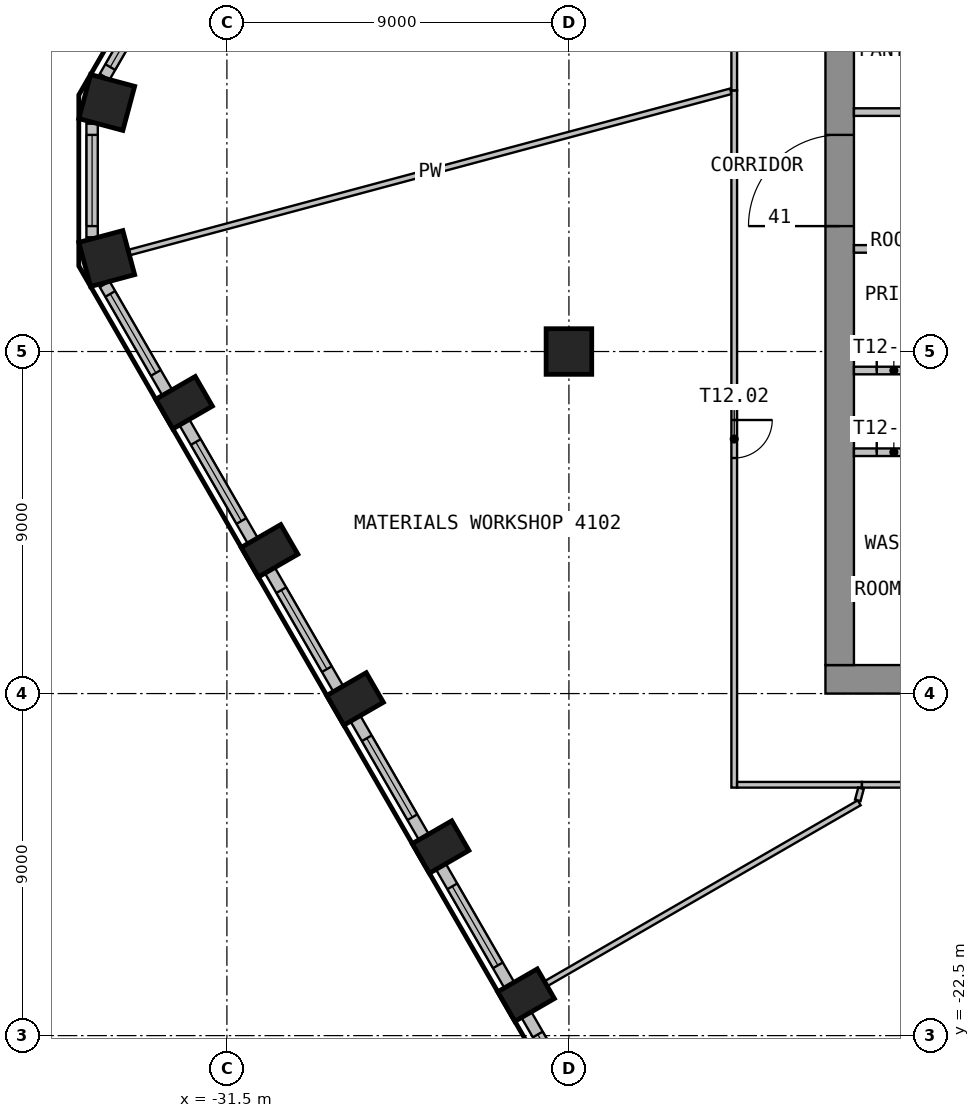
"""IFC4 building model, lengths in metres.
Left out: names, types, materials, properties, quantities, classifications, styles, units other than length and angle.
Written with IfcOpenShell. Run it as: python <this file> out.ifc"""

import sys

from ifc_helpers import new_model, si_unit, direction, frame, frame_2d, origin, origin_2d, place, context, subcontext, project, spatial, rectangle, circle, extrude, element, fill, save


model = new_model("IFC4")
c1 = context("Model", 3, precision=1e-05, world=origin(), true_north=direction((0.0, 1.0)))
c2 = subcontext(c1, "Body", "Model", "MODEL_VIEW")
j1 = project(units=[si_unit("LENGTHUNIT", "METRE"), si_unit("PLANEANGLEUNIT", "RADIAN")], contexts=[c1])
p1 = place(None, origin())
s1 = spatial("IfcSite", under=j1, at=p1, CompositionType="ELEMENT")
p2 = place(p1, origin())
s2 = spatial("IfcBuilding", under=s1, at=p2, CompositionType="ELEMENT")
p3 = place(p2, frame((0.0, 0.0, 167.7)))
s3 = spatial("IfcBuildingStorey", under=s2, at=p3, CompositionType="ELEMENT", Elevation=167.7)
for number, where, z_axis, x_axis in (
    (1, (-34.662, 2.053, 0.0), (0.0, 0.0, 1.0), (-0.259, -0.966, 0.0)),
    (2, (-34.662, -2.053, 0.0), (0.0, 0.0, 1.0), (0.259, -0.966, 0.0)),
):
    element("IfcColumn", number, at=place(p3, frame(where, z_axis=z_axis, x_axis=x_axis)), inside=s3, PredefinedType="COLUMN", context=c2, shape_type="SweptSolid", body=[
        extrude(rectangle(XDim=1.2, YDim=1.2, at=origin_2d()), origin(), (0.0, 0.0, 1.0), 3.575),
    ])
for number, where, z_axis, x_axis in (
    (3, (-32.627, -5.847, 0.0), (0.0, 0.0, 1.0), (0.5, -0.866, 0.0)),
    (4, (-30.377, -9.744, 0.0), (0.0, 0.0, 1.0), (0.5, -0.866, 0.0)),
    (5, (-28.127, -13.641, 0.0), (0.0, 0.0, 1.0), (0.5, -0.866, 0.0)),
    (6, (-25.877, -17.539, 0.0), (0.0, 0.0, 1.0), (0.5, -0.866, 0.0)),
    (7, (-23.627, -21.436, 0.0), (0.0, 0.0, 1.0), (0.5, -0.866, 0.0)),
):
    element("IfcColumn", number, at=place(p3, frame(where, z_axis=z_axis, x_axis=x_axis)), inside=s3, PredefinedType="COLUMN", context=c2, shape_type="SweptSolid", body=[
        extrude(rectangle(XDim=0.9, YDim=1.2, at=origin_2d()), origin(), (0.0, 0.0, 1.0), 3.575),
    ])
p4 = place(p3, frame((-22.5, -4.5, 0.0), z_axis=(0.0, 0.0, 1.0), x_axis=(1.0, 0.0, 0.0)))
e8 = element("IfcColumn", 8, at=p4, inside=s3, PredefinedType="COLUMN", context=c2, shape_type="SweptSolid", body=[
    extrude(circle(Radius=0.6, at=origin_2d()), origin(), (0.0, 0.0, 1.0), 3.575),
])
p5 = place(p3, frame((-33.069, 5.582, 0.0), z_axis=(0.0, 0.0, 1.0), x_axis=(-0.499981217486, -0.866036247602, 0.0)))
e9 = element("IfcWall", 9, at=p5, inside=s3, PredefinedType="SOLIDWALL", context=c2, shape_type="SweptSolid", body=[
    extrude(rectangle(XDim=3.294, YDim=0.3, at=frame_2d((1.647, 0.0))), origin(), (0.0, 0.0, 1.0), 3.575),
])
p6 = place(p5, frame((0.6, 0.0, 0.9)))
e10 = element("IfcOpeningElement", 10, at=p6, cuts=e9, PredefinedType="OPENING", context=c2, shape_type="SweptSolid", body=[
    extrude(rectangle(XDim=2.4, YDim=2.1, at=frame_2d((1.2, 1.05))), frame((0.0, 0.16, 0.0), z_axis=(0.0, -1.0, 0.0), x_axis=(1.0, 0.0, 0.0)), (0.0, 0.0, 1.0), 0.32),
])
p7 = place(p3, frame((-35.047, 1.495, 0.0), z_axis=(0.0, 0.0, 1.0), x_axis=(0.0, -1.0, 0.0)))
e11 = element("IfcWall", 11, at=p7, inside=s3, PredefinedType="SOLIDWALL", context=c2, shape_type="SweptSolid", body=[
    extrude(rectangle(XDim=2.989, YDim=0.3, at=frame_2d((1.495, 0.0))), origin(), (0.0, 0.0, 1.0), 3.575),
])
p8 = place(p7, frame((0.295, 0.0, 0.9)))
e12 = element("IfcOpeningElement", 12, at=p8, cuts=e11, PredefinedType="OPENING", context=c2, shape_type="SweptSolid", body=[
    extrude(rectangle(XDim=2.4, YDim=2.1, at=frame_2d((1.2, 1.05))), frame((0.0, 0.16, 0.0), z_axis=(0.0, -1.0, 0.0), x_axis=(1.0, 0.0, 0.0)), (0.0, 0.0, 1.0), 0.32),
])
p9 = place(p3, frame((-34.716, -2.729, 0.0), z_axis=(0.0, 0.0, 1.0), x_axis=(0.499981217486, -0.866036247602, 0.0)))
e13 = element("IfcWall", 13, at=p9, inside=s3, PredefinedType="SOLIDWALL", context=c2, shape_type="SweptSolid", body=[
    extrude(rectangle(XDim=3.294, YDim=0.3, at=frame_2d((1.647, 0.0))), origin(), (0.0, 0.0, 1.0), 3.575),
])
p10 = place(p9, frame((0.295, 0.0, 0.9)))
e14 = element("IfcOpeningElement", 14, at=p10, cuts=e13, PredefinedType="OPENING", context=c2, shape_type="SweptSolid", body=[
    extrude(rectangle(XDim=2.4, YDim=2.1, at=frame_2d((1.2, 1.05))), frame((0.0, 0.16, 0.0), z_axis=(0.0, -1.0, 0.0), x_axis=(1.0, 0.0, 0.0)), (0.0, 0.0, 1.0), 0.32),
])
p11 = place(p3, frame((-32.619, -6.362, 0.0), z_axis=(0.0, 0.0, 1.0), x_axis=(0.500027802648, -0.866009351323, 0.0)))
e15 = element("IfcWall", 15, at=p11, inside=s3, PredefinedType="SOLIDWALL", context=c2, shape_type="SweptSolid", body=[
    extrude(rectangle(XDim=3.599, YDim=0.3, at=frame_2d((1.799, 0.0))), origin(), (0.0, 0.0, 1.0), 3.575),
])
p12 = place(p11, frame((0.6, 0.0, 0.9)))
e16 = element("IfcOpeningElement", 16, at=p12, cuts=e15, PredefinedType="OPENING", context=c2, shape_type="SweptSolid", body=[
    extrude(rectangle(XDim=2.4, YDim=2.1, at=frame_2d((1.2, 1.05))), frame((0.0, 0.16, 0.0), z_axis=(0.0, -1.0, 0.0), x_axis=(1.0, 0.0, 0.0)), (0.0, 0.0, 1.0), 0.32),
])
p13 = place(p3, frame((-30.369, -10.26, 0.0), z_axis=(0.0, 0.0, 1.0), x_axis=(0.500027802648, -0.866009351323, 0.0)))
e17 = element("IfcWall", 17, at=p13, inside=s3, PredefinedType="SOLIDWALL", context=c2, shape_type="SweptSolid", body=[
    extrude(rectangle(XDim=3.599, YDim=0.3, at=frame_2d((1.799, 0.0))), origin(), (0.0, 0.0, 1.0), 3.575),
])
p14 = place(p13, frame((0.6, 0.0, 0.9)))
e18 = element("IfcOpeningElement", 18, at=p14, cuts=e17, PredefinedType="OPENING", context=c2, shape_type="SweptSolid", body=[
    extrude(rectangle(XDim=2.4, YDim=2.1, at=frame_2d((1.2, 1.05))), frame((0.0, 0.16, 0.0), z_axis=(0.0, -1.0, 0.0), x_axis=(1.0, 0.0, 0.0)), (0.0, 0.0, 1.0), 0.32),
])
p15 = place(p3, frame((-28.119, -14.156, 0.0), z_axis=(0.0, 0.0, 1.0), x_axis=(0.500027802648, -0.866009351323, 0.0)))
e19 = element("IfcWall", 19, at=p15, inside=s3, PredefinedType="SOLIDWALL", context=c2, shape_type="SweptSolid", body=[
    extrude(rectangle(XDim=3.599, YDim=0.3, at=frame_2d((1.799, 0.0))), origin(), (0.0, 0.0, 1.0), 3.575),
])
p16 = place(p15, frame((0.6, 0.0, 0.9)))
e20 = element("IfcOpeningElement", 20, at=p16, cuts=e19, PredefinedType="OPENING", context=c2, shape_type="SweptSolid", body=[
    extrude(rectangle(XDim=2.4, YDim=2.1, at=frame_2d((1.2, 1.05))), frame((0.0, 0.16, 0.0), z_axis=(0.0, -1.0, 0.0), x_axis=(1.0, 0.0, 0.0)), (0.0, 0.0, 1.0), 0.32),
])
p17 = place(p3, frame((-25.869, -18.054, 0.0), z_axis=(0.0, 0.0, 1.0), x_axis=(0.500027802648, -0.866009351323, 0.0)))
e21 = element("IfcWall", 21, at=p17, inside=s3, PredefinedType="SOLIDWALL", context=c2, shape_type="SweptSolid", body=[
    extrude(rectangle(XDim=3.599, YDim=0.3, at=frame_2d((1.799, 0.0))), origin(), (0.0, 0.0, 1.0), 3.575),
])
p18 = place(p17, frame((0.6, 0.0, 0.9)))
e22 = element("IfcOpeningElement", 22, at=p18, cuts=e21, PredefinedType="OPENING", context=c2, shape_type="SweptSolid", body=[
    extrude(rectangle(XDim=2.4, YDim=2.1, at=frame_2d((1.2, 1.05))), frame((0.0, 0.16, 0.0), z_axis=(0.0, -1.0, 0.0), x_axis=(1.0, 0.0, 0.0)), (0.0, 0.0, 1.0), 0.32),
])
p19 = place(p3, frame((-23.619, -21.951, 0.0), z_axis=(0.0, 0.0, 1.0), x_axis=(0.500036802197, -0.866004154983, 0.0)))
e23 = element("IfcWall", 23, at=p19, inside=s3, PredefinedType="SOLIDWALL", context=c2, shape_type="SweptSolid", body=[
    extrude(rectangle(XDim=3.294, YDim=0.3, at=frame_2d((1.647, 0.0))), origin(), (0.0, 0.0, 1.0), 3.575),
])
p20 = place(p19, frame((0.6, 0.0, 0.9)))
e24 = element("IfcOpeningElement", 24, at=p20, cuts=e23, PredefinedType="OPENING", context=c2, shape_type="SweptSolid", body=[
    extrude(rectangle(XDim=2.4, YDim=2.1, at=frame_2d((1.2, 1.05))), frame((0.0, 0.16, 0.0), z_axis=(0.0, -1.0, 0.0), x_axis=(1.0, 0.0, 0.0)), (0.0, 0.0, 1.0), 0.32),
])
p21 = place(p3, frame((-15.75, -13.125, 0.0), z_axis=(0.0, 0.0, 1.0), x_axis=(1.0, 0.0, 0.0)))
e25 = element("IfcWall", 25, at=p21, inside=s3, PredefinedType="SHEAR", context=c2, shape_type="SweptSolid", body=[
    extrude(rectangle(XDim=31.5, YDim=0.75, at=frame_2d((15.75, 0.0))), origin(), (0.0, 0.0, 1.0), 3.575),
])
p22 = place(p21, frame((14.55, 0.0, 0.0)))
e26 = element("IfcOpeningElement", 26, at=p22, cuts=e25, PredefinedType="OPENING", context=c2, shape_type="SweptSolid", body=[
    extrude(rectangle(XDim=2.4, YDim=2.1, at=frame_2d((1.2, 1.05))), frame((0.0, 0.385, 0.0), z_axis=(0.0, -1.0, 0.0), x_axis=(1.0, 0.0, 0.0)), (0.0, 0.0, 1.0), 0.77),
])
p23 = place(p21, frame((3.3, 0.0, 0.0)))
e27 = element("IfcOpeningElement", 27, at=p23, cuts=e25, PredefinedType="OPENING", context=c2, shape_type="SweptSolid", body=[
    extrude(rectangle(XDim=1.2, YDim=2.1, at=frame_2d((0.6, 1.05))), frame((0.0, 0.385, 0.0), z_axis=(0.0, -1.0, 0.0), x_axis=(1.0, 0.0, 0.0)), (0.0, 0.0, 1.0), 0.77),
])
p24 = place(p21, frame((27.0, 0.0, 0.0)))
e28 = element("IfcOpeningElement", 28, at=p24, cuts=e25, PredefinedType="OPENING", context=c2, shape_type="SweptSolid", body=[
    extrude(rectangle(XDim=1.2, YDim=2.1, at=frame_2d((0.6, 1.05))), frame((0.0, 0.385, 0.0), z_axis=(0.0, -1.0, 0.0), x_axis=(1.0, 0.0, 0.0)), (0.0, 0.0, 1.0), 0.77),
])
p25 = place(p3, frame((-15.375, -12.75, 0.0), z_axis=(0.0, 0.0, 1.0), x_axis=(0.0, 1.0, 0.0)))
e29 = element("IfcWall", 29, at=p25, inside=s3, PredefinedType="SHEAR", context=c2, shape_type="SweptSolid", body=[
    extrude(rectangle(XDim=25.5, YDim=0.75, at=frame_2d((12.75, 0.0))), origin(), (0.0, 0.0, 1.0), 3.575),
])
p26 = place(p25, frame((11.55, 0.0, 0.0)))
e30 = element("IfcOpeningElement", 30, at=p26, cuts=e29, PredefinedType="OPENING", context=c2, shape_type="SweptSolid", body=[
    extrude(rectangle(XDim=2.4, YDim=2.1, at=frame_2d((1.2, 1.05))), frame((0.0, 0.385, 0.0), z_axis=(0.0, -1.0, 0.0), x_axis=(1.0, 0.0, 0.0)), (0.0, 0.0, 1.0), 0.77),
])
p27 = place(p3, frame((-15.0, 1.8, 0.0), z_axis=(0.0, 0.0, 1.0), x_axis=(1.0, 0.0, 0.0)))
e31 = element("IfcWall", 31, at=p27, inside=s3, PredefinedType="PARTITIONING", context=c2, shape_type="SweptSolid", body=[
    extrude(rectangle(XDim=2.1, YDim=0.2, at=frame_2d((1.05, 0.0))), origin(), (0.0, 0.0, 1.0), 3.575),
])
p28 = place(p3, frame((-15.0, -7.15, 0.0), z_axis=(0.0, 0.0, 1.0), x_axis=(1.0, 0.0, 0.0)))
e32 = element("IfcWall", 32, at=p28, inside=s3, PredefinedType="PARTITIONING", context=c2, shape_type="SweptSolid", body=[
    extrude(rectangle(XDim=2.1, YDim=0.2, at=frame_2d((1.05, 0.0))), origin(), (0.0, 0.0, 1.0), 3.575),
])
p29 = place(p28, frame((0.6, 0.0, 0.0)))
e33 = element("IfcOpeningElement", 33, at=p29, cuts=e32, PredefinedType="OPENING", context=c2, shape_type="SweptSolid", body=[
    extrude(rectangle(XDim=0.9, YDim=2.1, at=frame_2d((0.45, 1.05))), frame((0.0, 0.11, 0.0), z_axis=(0.0, -1.0, 0.0), x_axis=(1.0, 0.0, 0.0)), (0.0, 0.0, 1.0), 0.22),
])
p30 = place(p3, frame((-15.0, -5.0, 0.0), z_axis=(0.0, 0.0, 1.0), x_axis=(1.0, 0.0, 0.0)))
e34 = element("IfcWall", 34, at=p30, inside=s3, PredefinedType="PARTITIONING", context=c2, shape_type="SweptSolid", body=[
    extrude(rectangle(XDim=2.1, YDim=0.2, at=frame_2d((1.05, 0.0))), origin(), (0.0, 0.0, 1.0), 3.575),
])
p31 = place(p30, frame((0.6, 0.0, 0.0)))
e35 = element("IfcOpeningElement", 35, at=p31, cuts=e34, PredefinedType="OPENING", context=c2, shape_type="SweptSolid", body=[
    extrude(rectangle(XDim=0.9, YDim=2.1, at=frame_2d((0.45, 1.05))), frame((0.0, 0.11, 0.0), z_axis=(0.0, -1.0, 0.0), x_axis=(1.0, 0.0, 0.0)), (0.0, 0.0, 1.0), 0.22),
])
p32 = place(p3, frame((-15.0, -1.8, 0.0), z_axis=(0.0, 0.0, 1.0), x_axis=(1.0, 0.0, 0.0)))
e36 = element("IfcWall", 36, at=p32, inside=s3, PredefinedType="PARTITIONING", context=c2, shape_type="SweptSolid", body=[
    extrude(rectangle(XDim=2.1, YDim=0.2, at=frame_2d((1.05, 0.0))), origin(), (0.0, 0.0, 1.0), 3.575),
])
p33 = place(p3, frame((-18.242, 2.346, 0.0), z_axis=(0.0, 0.0, 1.0), x_axis=(-0.965923767179, -0.258826729682, 0.0)))
e37 = element("IfcWall", 37, at=p33, inside=s3, PredefinedType="PARTITIONING", context=c2, shape_type="SweptSolid", body=[
    extrude(rectangle(XDim=16.38, YDim=0.15, at=frame_2d((8.19, 0.0))), origin(), (0.0, 0.0, 1.0), 3.575),
])
p34 = place(p3, frame((-14.861, -16.375, 0.0), z_axis=(0.0, 0.0, 1.0), x_axis=(-0.866011447264, -0.500024172624, 0.0)))
e38 = element("IfcWall", 38, at=p34, inside=s3, PredefinedType="PARTITIONING", context=c2, shape_type="SweptSolid", body=[
    extrude(rectangle(XDim=9.502, YDim=0.15, at=frame_2d((4.751, 0.0))), origin(), (0.0, 0.0, 1.0), 3.575),
])
p35 = place(p3, frame((-18.15, 2.371, 0.0), z_axis=(0.0, 0.0, 1.0), x_axis=(0.0, -1.0, 0.0)))
e39 = element("IfcWall", 39, at=p35, inside=s3, PredefinedType="PARTITIONING", context=c2, shape_type="SweptSolid", body=[
    extrude(rectangle(XDim=18.346, YDim=0.15, at=frame_2d((9.173, 0.0))), origin(), (0.0, 0.0, 1.0), 3.575),
])
p36 = place(p35, frame((8.673, 0.0, 0.0)))
e40 = element("IfcOpeningElement", 40, at=p36, cuts=e39, PredefinedType="OPENING", context=c2, shape_type="SweptSolid", body=[
    extrude(rectangle(XDim=1.0, YDim=2.1, at=frame_2d((0.5, 1.05))), frame((0.0, 0.085, 0.0), z_axis=(0.0, -1.0, 0.0), x_axis=(1.0, 0.0, 0.0)), (0.0, 0.0, 1.0), 0.17),
])
p37 = place(p3, frame((-18.075, -15.9, 0.0), z_axis=(0.0, 0.0, 1.0), x_axis=(1.0, 0.0, 0.0)))
e41 = element("IfcWall", 41, at=p37, inside=s3, PredefinedType="PARTITIONING", context=c2, shape_type="SweptSolid", body=[
    extrude(rectangle(XDim=3.286, YDim=0.15, at=frame_2d((1.643, 0.0))), origin(), (0.0, 0.0, 1.0), 3.575),
])
p38 = place(p3, frame((-18.15, 15.975, 0.0), z_axis=(0.0, 0.0, 1.0), x_axis=(0.0, -1.0, 0.0)))
e42 = element("IfcWall", 42, at=p38, inside=s3, PredefinedType="PARTITIONING", context=c2, shape_type="SweptSolid", body=[
    extrude(rectangle(XDim=13.604, YDim=0.15, at=frame_2d((6.802, 0.0))), origin(), (0.0, 0.0, 1.0), 3.575),
])
p39 = place(p38, frame((6.302, 0.0, 0.0)))
e43 = element("IfcOpeningElement", 43, at=p39, cuts=e42, PredefinedType="OPENING", context=c2, shape_type="SweptSolid", body=[
    extrude(rectangle(XDim=1.0, YDim=2.1, at=frame_2d((0.5, 1.05))), frame((0.0, 0.085, 0.0), z_axis=(0.0, -1.0, 0.0), x_axis=(1.0, 0.0, 0.0)), (0.0, 0.0, 1.0), 0.17),
])
p40 = place(p3, frame((-14.814, -15.992, 0.0), z_axis=(0.0, 0.0, 1.0), x_axis=(-0.257478443243, -0.966284042746, 0.0)))
e44 = element("IfcWall", 44, at=p40, inside=s3, PredefinedType="PARTITIONING", context=c2, shape_type="SweptSolid", body=[
    extrude(rectangle(XDim=0.33, YDim=0.15, at=frame_2d((0.165, 0.0))), origin(), (0.0, 0.0, 1.0), 3.575),
])
p41 = place(p3, frame((-14.789, -15.9, 0.0), z_axis=(0.0, 0.0, 1.0), x_axis=(1.0, 0.0, 0.0)))
e45 = element("IfcWall", 45, at=p41, inside=s3, PredefinedType="PARTITIONING", context=c2, shape_type="SweptSolid", body=[
    extrude(rectangle(XDim=10.289, YDim=0.15, at=frame_2d((5.145, 0.0))), origin(), (0.0, 0.0, 1.0), 3.575),
])
p42 = place(p41, frame((4.645, 0.0, 0.0)))
e46 = element("IfcOpeningElement", 46, at=p42, cuts=e45, PredefinedType="OPENING", context=c2, shape_type="SweptSolid", body=[
    extrude(rectangle(XDim=1.0, YDim=2.1, at=frame_2d((0.5, 1.05))), frame((0.0, 0.085, 0.0), z_axis=(0.0, -1.0, 0.0), x_axis=(1.0, 0.0, 0.0)), (0.0, 0.0, 1.0), 0.17),
])
p43 = place(p6, origin())
e47 = element("IfcWindow", 47, at=p43, inside=s3, PartitioningType="SINGLE_PANEL", PredefinedType="WINDOW", context=c2, shape_type="SweptSolid", body=[
    extrude(rectangle(XDim=2.4, YDim=2.1, at=frame_2d((1.2, 1.05))), frame((0.0, 0.03, 0.0), z_axis=(0.0, -1.0, 0.0), x_axis=(1.0, 0.0, 0.0)), (0.0, 0.0, 1.0), 0.06),
])
fill(e10, e47)
p44 = place(p8, origin())
e48 = element("IfcWindow", 48, at=p44, inside=s3, PartitioningType="SINGLE_PANEL", PredefinedType="WINDOW", context=c2, shape_type="SweptSolid", body=[
    extrude(rectangle(XDim=2.4, YDim=2.1, at=frame_2d((1.2, 1.05))), frame((0.0, 0.03, 0.0), z_axis=(0.0, -1.0, 0.0), x_axis=(1.0, 0.0, 0.0)), (0.0, 0.0, 1.0), 0.06),
])
fill(e12, e48)
p45 = place(p10, origin())
e49 = element("IfcWindow", 49, at=p45, inside=s3, PartitioningType="SINGLE_PANEL", PredefinedType="WINDOW", context=c2, shape_type="SweptSolid", body=[
    extrude(rectangle(XDim=2.4, YDim=2.1, at=frame_2d((1.2, 1.05))), frame((0.0, 0.03, 0.0), z_axis=(0.0, -1.0, 0.0), x_axis=(1.0, 0.0, 0.0)), (0.0, 0.0, 1.0), 0.06),
])
fill(e14, e49)
p46 = place(p12, origin())
e50 = element("IfcWindow", 50, at=p46, inside=s3, PartitioningType="SINGLE_PANEL", PredefinedType="WINDOW", context=c2, shape_type="SweptSolid", body=[
    extrude(rectangle(XDim=2.4, YDim=2.1, at=frame_2d((1.2, 1.05))), frame((0.0, 0.03, 0.0), z_axis=(0.0, -1.0, 0.0), x_axis=(1.0, 0.0, 0.0)), (0.0, 0.0, 1.0), 0.06),
])
fill(e16, e50)
p47 = place(p14, origin())
e51 = element("IfcWindow", 51, at=p47, inside=s3, PartitioningType="SINGLE_PANEL", PredefinedType="WINDOW", context=c2, shape_type="SweptSolid", body=[
    extrude(rectangle(XDim=2.4, YDim=2.1, at=frame_2d((1.2, 1.05))), frame((0.0, 0.03, 0.0), z_axis=(0.0, -1.0, 0.0), x_axis=(1.0, 0.0, 0.0)), (0.0, 0.0, 1.0), 0.06),
])
fill(e18, e51)
p48 = place(p16, origin())
e52 = element("IfcWindow", 52, at=p48, inside=s3, PartitioningType="SINGLE_PANEL", PredefinedType="WINDOW", context=c2, shape_type="SweptSolid", body=[
    extrude(rectangle(XDim=2.4, YDim=2.1, at=frame_2d((1.2, 1.05))), frame((0.0, 0.03, 0.0), z_axis=(0.0, -1.0, 0.0), x_axis=(1.0, 0.0, 0.0)), (0.0, 0.0, 1.0), 0.06),
])
fill(e20, e52)
p49 = place(p18, origin())
e53 = element("IfcWindow", 53, at=p49, inside=s3, PartitioningType="SINGLE_PANEL", PredefinedType="WINDOW", context=c2, shape_type="SweptSolid", body=[
    extrude(rectangle(XDim=2.4, YDim=2.1, at=frame_2d((1.2, 1.05))), frame((0.0, 0.03, 0.0), z_axis=(0.0, -1.0, 0.0), x_axis=(1.0, 0.0, 0.0)), (0.0, 0.0, 1.0), 0.06),
])
fill(e22, e53)
p50 = place(p20, origin())
e54 = element("IfcWindow", 54, at=p50, inside=s3, PartitioningType="SINGLE_PANEL", PredefinedType="WINDOW", context=c2, shape_type="SweptSolid", body=[
    extrude(rectangle(XDim=2.4, YDim=2.1, at=frame_2d((1.2, 1.05))), frame((0.0, 0.03, 0.0), z_axis=(0.0, -1.0, 0.0), x_axis=(1.0, 0.0, 0.0)), (0.0, 0.0, 1.0), 0.06),
])
fill(e24, e54)
p51 = place(p26, origin())
e55 = element("IfcDoor", 55, at=p51, inside=s3, OperationType="DOUBLE_DOOR_DOUBLE_SWING", PredefinedType="DOOR", context=c2, shape_type="SweptSolid", body=[
    extrude(rectangle(XDim=2.4, YDim=2.1, at=frame_2d((1.2, 1.05))), frame((0.0, 0.025, 0.0), z_axis=(0.0, -1.0, 0.0), x_axis=(1.0, 0.0, 0.0)), (0.0, 0.0, 1.0), 0.05),
])
fill(e30, e55)
p52 = place(p29, origin())
e56 = element("IfcDoor", 56, at=p52, inside=s3, OperationType="SINGLE_SWING_LEFT", PredefinedType="DOOR", context=c2, shape_type="SweptSolid", body=[
    extrude(rectangle(XDim=0.9, YDim=2.1, at=frame_2d((0.45, 1.05))), frame((0.0, 0.025, 0.0), z_axis=(0.0, -1.0, 0.0), x_axis=(1.0, 0.0, 0.0)), (0.0, 0.0, 1.0), 0.05),
])
fill(e33, e56)
p53 = place(p31, origin())
e57 = element("IfcDoor", 57, at=p53, inside=s3, OperationType="SINGLE_SWING_LEFT", PredefinedType="DOOR", context=c2, shape_type="SweptSolid", body=[
    extrude(rectangle(XDim=0.9, YDim=2.1, at=frame_2d((0.45, 1.05))), frame((0.0, 0.025, 0.0), z_axis=(0.0, -1.0, 0.0), x_axis=(1.0, 0.0, 0.0)), (0.0, 0.0, 1.0), 0.05),
])
fill(e35, e57)
p54 = place(p36, origin())
e58 = element("IfcDoor", 58, at=p54, inside=s3, OperationType="SINGLE_SWING_RIGHT", PredefinedType="DOOR", context=c2, shape_type="SweptSolid", body=[
    extrude(rectangle(XDim=1.0, YDim=2.1, at=frame_2d((0.5, 1.05))), frame((0.0, 0.025, 0.0), z_axis=(0.0, -1.0, 0.0), x_axis=(1.0, 0.0, 0.0)), (0.0, 0.0, 1.0), 0.05),
])
fill(e40, e58)
save(model, sys.argv[1])
